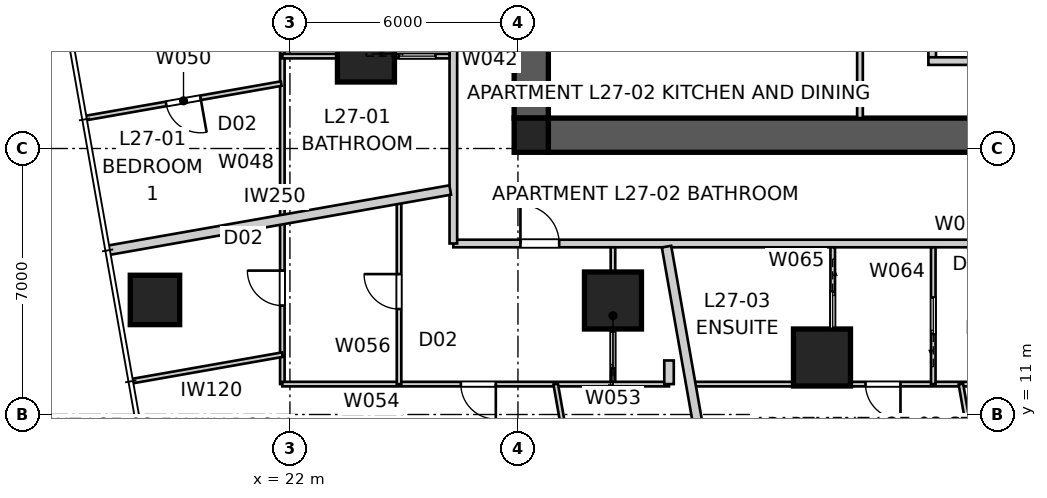
"""IFC4 building model, lengths in metres.
Left out: names, types, materials, properties, quantities, classifications, styles, units other than length and angle.
Written with IfcOpenShell. Run it as: python <this file> out.ifc"""

import sys

from ifc_helpers import new_model, si_unit, direction, frame, frame_2d, origin, origin_2d, place, context, subcontext, project, spatial, polyline, rectangle, outline, extrude, element, fill, save


model = new_model("IFC4")
c1 = context("Model", 3, precision=1e-05, world=origin(), true_north=direction((0.0, 1.0)))
c2 = subcontext(c1, "Body", "Model", "MODEL_VIEW")
j1 = project(units=[si_unit("LENGTHUNIT", "METRE"), si_unit("PLANEANGLEUNIT", "RADIAN")], contexts=[c1])
p1 = place(None, origin())
s1 = spatial("IfcSite", under=j1, at=p1, CompositionType="ELEMENT")
p2 = place(p1, origin())
s2 = spatial("IfcBuilding", under=s1, at=p2, CompositionType="ELEMENT")
p3 = place(p2, frame((0.0, 0.0, 99.8)))
s3 = spatial("IfcBuildingStorey", under=s2, at=p3, CompositionType="ELEMENT", Elevation=99.8)
p4 = place(p3, frame((51.2, 18.35, 0.0), z_axis=(0.0, 0.0, 1.0), x_axis=(-1.0, 0.0, 0.0)))
e1 = element("IfcWall", 1, at=p4, inside=s3, PredefinedType="SHEAR", context=c2, shape_type="SweptSolid", body=[
    extrude(outline(polyline([(0.0, -0.45), (22.4, -0.45), (22.4, -0.025), (22.85, -0.025), (22.85, 0.025), (22.4, 0.025), (22.4, 0.45), (0.0, 0.45), (0.0, 0.025), (-0.45, 0.025), (-0.45, -0.025), (0.0, -0.025), (0.0, -0.45)])), origin(), (0.0, 0.0, 1.0), 3.4),
])
p5 = place(p3, frame((28.35, 41.2, 0.0), z_axis=(0.0, 0.0, 1.0), x_axis=(0.0, -1.0, 0.0)))
e2 = element("IfcWall", 2, at=p5, inside=s3, PredefinedType="SHEAR", context=c2, shape_type="SweptSolid", body=[
    extrude(outline(polyline([(0.0, -0.45), (22.4, -0.45), (22.4, -0.025), (22.85, -0.025), (22.85, 0.025), (22.4, 0.025), (22.4, 0.45), (0.0, 0.45), (0.0, 0.025), (-0.45, 0.025), (-0.45, -0.025), (0.0, -0.025), (0.0, -0.45)])), origin(), (0.0, 0.0, 1.0), 3.4),
])
p6 = place(p5, frame((11.14, 0.0, 0.0)))
e3 = element("IfcOpeningElement", 3, at=p6, cuts=e2, PredefinedType="OPENING", context=c2, shape_type="SweptSolid", body=[
    extrude(rectangle(XDim=1.02, YDim=2.4, at=frame_2d((0.51, 1.2))), frame((0.0, 0.46, 0.0), z_axis=(0.0, -1.0, 0.0), x_axis=(1.0, 0.0, 0.0)), (0.0, 0.0, 1.0), 0.92),
])
p7 = place(p3, frame((38.9, 22.4, 0.0), z_axis=(0.0, 0.0, 1.0), x_axis=(0.0, -1.0, 0.0)))
e4 = element("IfcWall", 4, at=p7, inside=s3, PredefinedType="SOLIDWALL", context=c2, shape_type="SweptSolid", body=[
    extrude(rectangle(XDim=2.0, YDim=0.2, at=frame_2d((1.0, 0.0))), origin(), (0.0, 0.0, 1.0), 3.4),
])
p8 = place(p3, frame((38.8, 20.3, 0.0), z_axis=(0.0, 0.0, 1.0), x_axis=(1.0, 0.0, 0.0)))
e5 = element("IfcWall", 5, at=p8, inside=s3, PredefinedType="SOLIDWALL", context=c2, shape_type="SweptSolid", body=[
    extrude(rectangle(XDim=2.4, YDim=0.2, at=frame_2d((1.2, 0.0))), origin(), (0.0, 0.0, 1.0), 3.4),
])
p9 = place(p3, frame((28.35, 18.35, 0.0), z_axis=(0.0, 0.0, 1.0), x_axis=(1.0, 0.0, 0.0)))
e6 = element("IfcColumn", 6, at=p9, inside=s3, PredefinedType="COLUMN", context=c2, shape_type="SweptSolid", body=[
    extrude(rectangle(XDim=0.9, YDim=0.9, at=origin_2d()), origin(), (0.0, 0.0, 1.0), 3.4),
])
p10 = place(p3, frame((18.448, 14.015, 0.0), z_axis=(0.0, 0.0, 1.0), x_axis=(1.0, 0.0, 0.0)))
e7 = element("IfcColumn", 7, at=p10, inside=s3, PredefinedType="COLUMN", context=c2, shape_type="SweptSolid", body=[
    extrude(rectangle(XDim=1.3, YDim=1.3, at=origin_2d()), origin(), (0.0, 0.0, 1.0), 3.4),
])
for number, where, z_axis, x_axis in (
    (8, (24.0, 20.5, 0.0), (0.0, 0.0, 1.0), (1.0, 0.0, 0.0)),
    (9, (30.5, 14.0, 0.0), (0.0, 0.0, 1.0), (1.0, 0.0, 0.0)),
    (10, (36.0, 12.5, 0.0), (0.0, 0.0, 1.0), (1.0, 0.0, 0.0)),
):
    element("IfcColumn", number, at=place(p3, frame(where, z_axis=z_axis, x_axis=x_axis)), inside=s3, PredefinedType="COLUMN", context=c2, shape_type="SweptSolid", body=[
        extrude(rectangle(XDim=1.5, YDim=1.5, at=origin_2d()), origin(), (0.0, 0.0, 1.0), 3.4),
    ])
p11 = place(p3, frame((26.3, 15.5, 0.0), z_axis=(0.0, 0.0, 1.0), x_axis=(1.0, 0.0, 0.0)))
e11 = element("IfcWall", 11, at=p11, inside=s3, PredefinedType="PARTITIONING", context=c2, shape_type="SweptSolid", body=[
    extrude(rectangle(XDim=27.4, YDim=0.2, at=frame_2d((13.7, 0.0))), origin(), (0.0, 0.0, 1.0), 3.25),
])
p12 = place(p11, frame((24.005, 0.0, 0.0)))
e12 = element("IfcOpeningElement", 12, at=p12, cuts=e11, PredefinedType="OPENING", context=c2, shape_type="SweptSolid", body=[
    extrude(rectangle(XDim=1.02, YDim=2.1, at=frame_2d((0.51, 1.05))), frame((0.0, 0.11, 0.0), z_axis=(0.0, -1.0, 0.0), x_axis=(1.0, 0.0, 0.0)), (0.0, 0.0, 1.0), 0.22),
])
p13 = place(p11, frame((1.765, 0.0, 0.0)))
e13 = element("IfcOpeningElement", 13, at=p13, cuts=e11, PredefinedType="OPENING", context=c2, shape_type="SweptSolid", body=[
    extrude(rectangle(XDim=1.02, YDim=2.1, at=frame_2d((0.51, 1.05))), frame((0.0, 0.11, 0.0), z_axis=(0.0, -1.0, 0.0), x_axis=(1.0, 0.0, 0.0)), (0.0, 0.0, 1.0), 0.22),
])
p14 = place(p3, frame((26.3, 44.5, 0.0), z_axis=(0.0, 0.0, 1.0), x_axis=(0.0, -1.0, 0.0)))
e14 = element("IfcWall", 14, at=p14, inside=s3, PredefinedType="PARTITIONING", context=c2, shape_type="SweptSolid", body=[
    extrude(rectangle(XDim=29.0, YDim=0.2, at=frame_2d((14.5, 0.0))), origin(), (0.0, 0.0, 1.0), 3.25),
])
p15 = place(p14, frame((14.257, 0.0, 0.0)))
e15 = element("IfcOpeningElement", 15, at=p15, cuts=e14, PredefinedType="OPENING", context=c2, shape_type="SweptSolid", body=[
    extrude(rectangle(XDim=1.02, YDim=2.34, at=frame_2d((0.51, 1.17))), frame((0.0, 0.11, 0.0), z_axis=(0.0, -1.0, 0.0), x_axis=(1.0, 0.0, 0.0)), (0.0, 0.0, 1.0), 0.22),
])
p16 = place(p14, frame((18.322, 0.0, 0.0)))
e16 = element("IfcOpeningElement", 16, at=p16, cuts=e14, PredefinedType="OPENING", context=c2, shape_type="SweptSolid", body=[
    extrude(rectangle(XDim=1.02, YDim=2.34, at=frame_2d((0.51, 1.17))), frame((0.0, 0.11, 0.0), z_axis=(0.0, -1.0, 0.0), x_axis=(1.0, 0.0, 0.0)), (0.0, 0.0, 1.0), 0.22),
])
p17 = place(p14, frame((3.963, 0.0, 0.0)))
e17 = element("IfcOpeningElement", 17, at=p17, cuts=e14, PredefinedType="OPENING", context=c2, shape_type="SweptSolid", body=[
    extrude(rectangle(XDim=1.02, YDim=2.34, at=frame_2d((0.51, 1.17))), frame((0.0, 0.11, 0.0), z_axis=(0.0, -1.0, 0.0), x_axis=(1.0, 0.0, 0.0)), (0.0, 0.0, 1.0), 0.22),
])
p18 = place(p3, frame((34.001, 3.556, 0.0), z_axis=(0.0, 0.0, 1.0), x_axis=(-0.173654664517, 0.984806609184, 0.0)))
e18 = element("IfcWall", 18, at=p18, inside=s3, PredefinedType="PARTITIONING", context=c2, shape_type="SweptSolid", body=[
    extrude(rectangle(XDim=12.044, YDim=0.25, at=frame_2d((6.022, 0.0))), origin(), (0.0, 0.0, 1.0), 3.25),
])
p19 = place(p3, frame((17.203, 15.318, 0.0), z_axis=(0.0, 0.0, 1.0), x_axis=(0.984810933893, 0.173630137029, 0.0)))
e19 = element("IfcWall", 19, at=p19, inside=s3, PredefinedType="PARTITIONING", context=c2, shape_type="SweptSolid", body=[
    extrude(rectangle(XDim=9.154, YDim=0.25, at=frame_2d((4.577, 0.0))), origin(), (0.0, 0.0, 1.0), 3.25),
])
p20 = place(p3, frame((37.0, 18.8, 0.0), z_axis=(0.0, 0.0, 1.0), x_axis=(0.0, 1.0, 0.0)))
e20 = element("IfcWall", 20, at=p20, inside=s3, PredefinedType="SOLIDWALL", context=c2, shape_type="SweptSolid", body=[
    extrude(rectangle(XDim=5.9, YDim=0.15, at=frame_2d((2.95, 0.0))), origin(), (0.0, 0.0, 1.0), 3.25),
])
p21 = place(p3, frame((21.8, 11.8, 0.0), z_axis=(0.0, 0.0, 1.0), x_axis=(0.0, 1.0, 0.0)))
e21 = element("IfcWall", 21, at=p21, inside=s3, PredefinedType="PARTITIONING", context=c2, shape_type="SweptSolid", body=[
    extrude(rectangle(XDim=25.653, YDim=0.12, at=frame_2d((12.826, 0.0))), origin(), (0.0, 0.0, 1.0), 3.25),
])
p22 = place(p21, frame((16.333, 0.0, 0.0)))
e22 = element("IfcOpeningElement", 22, at=p22, cuts=e21, PredefinedType="OPENING", context=c2, shape_type="SweptSolid", body=[
    extrude(rectangle(XDim=0.92, YDim=2.34, at=frame_2d((0.46, 1.17))), frame((0.0, 0.07, 0.0), z_axis=(0.0, -1.0, 0.0), x_axis=(1.0, 0.0, 0.0)), (0.0, 0.0, 1.0), 0.14),
])
p23 = place(p21, frame((18.821, 0.0, 0.0)))
e23 = element("IfcOpeningElement", 23, at=p23, cuts=e21, PredefinedType="OPENING", context=c2, shape_type="SweptSolid", body=[
    extrude(rectangle(XDim=0.92, YDim=2.34, at=frame_2d((0.46, 1.17))), frame((0.0, 0.07, 0.0), z_axis=(0.0, -1.0, 0.0), x_axis=(1.0, 0.0, 0.0)), (0.0, 0.0, 1.0), 0.14),
])
p24 = place(p21, frame((12.401, 0.0, 0.0)))
e24 = element("IfcOpeningElement", 24, at=p24, cuts=e21, PredefinedType="OPENING", context=c2, shape_type="SweptSolid", body=[
    extrude(rectangle(XDim=0.92, YDim=2.34, at=frame_2d((0.46, 1.17))), frame((0.0, 0.07, 0.0), z_axis=(0.0, -1.0, 0.0), x_axis=(1.0, 0.0, 0.0)), (0.0, 0.0, 1.0), 0.14),
])
p25 = place(p21, frame((2.066, 0.0, 0.0)))
e25 = element("IfcOpeningElement", 25, at=p25, cuts=e21, PredefinedType="OPENING", context=c2, shape_type="SweptSolid", body=[
    extrude(rectangle(XDim=0.92, YDim=2.34, at=frame_2d((0.46, 1.17))), frame((0.0, 0.07, 0.0), z_axis=(0.0, -1.0, 0.0), x_axis=(1.0, 0.0, 0.0)), (0.0, 0.0, 1.0), 0.14),
])
p26 = place(p21, frame((23.651, 0.0, 0.0)))
e26 = element("IfcOpeningElement", 26, at=p26, cuts=e21, PredefinedType="OPENING", context=c2, shape_type="SweptSolid", body=[
    extrude(rectangle(XDim=0.96, YDim=2.1, at=frame_2d((0.48, 1.05))), frame((0.0, 0.07, 0.0), z_axis=(0.0, -1.0, 0.0), x_axis=(1.0, 0.0, 0.0)), (0.0, 0.0, 1.0), 0.14),
])
p27 = place(p3, frame((21.8, 20.431, 0.0), z_axis=(0.0, 0.0, 1.0), x_axis=(1.0, 0.0, 0.0)))
e27 = element("IfcWall", 27, at=p27, inside=s3, PredefinedType="PARTITIONING", context=c2, shape_type="SweptSolid", body=[
    extrude(rectangle(XDim=4.4, YDim=0.12, at=frame_2d((2.2, 0.0))), origin(), (0.0, 0.0, 1.0), 3.25),
])
p28 = place(p27, frame((3.07, 0.0, 0.0)))
e28 = element("IfcOpeningElement", 28, at=p28, cuts=e27, PredefinedType="OPENING", context=c2, shape_type="SweptSolid", body=[
    extrude(rectangle(XDim=0.96, YDim=2.1, at=frame_2d((0.48, 1.05))), frame((0.0, 0.07, 0.0), z_axis=(0.0, -1.0, 0.0), x_axis=(1.0, 0.0, 0.0)), (0.0, 0.0, 1.0), 0.14),
])
p29 = place(p3, frame((21.77, 19.708, 0.0), z_axis=(0.0, 0.0, 1.0), x_axis=(-0.984812268581, -0.173622566657, 0.0)))
e29 = element("IfcWall", 29, at=p29, inside=s3, PredefinedType="PARTITIONING", context=c2, shape_type="SweptSolid", body=[
    extrude(rectangle(XDim=5.22, YDim=0.12, at=frame_2d((2.61, 0.0))), origin(), (0.0, 0.0, 1.0), 3.25),
])
p30 = place(p29, frame((2.155, 0.0, 0.0)))
e30 = element("IfcOpeningElement", 30, at=p30, cuts=e29, PredefinedType="OPENING", context=c2, shape_type="SweptSolid", body=[
    extrude(rectangle(XDim=0.92, YDim=2.34, at=frame_2d((0.46, 1.17))), frame((0.0, 0.07, 0.0), z_axis=(0.0, -1.0, 0.0), x_axis=(1.0, 0.0, 0.0)), (0.0, 0.0, 1.0), 0.14),
])
p31 = place(p3, frame((30.5, 11.8, 0.0), z_axis=(0.0, 0.0, 1.0), x_axis=(0.0, 1.0, 0.0)))
e31 = element("IfcWall", 31, at=p31, inside=s3, PredefinedType="PARTITIONING", context=c2, shape_type="SweptSolid", body=[
    extrude(rectangle(XDim=3.6, YDim=0.12, at=frame_2d((1.8, 0.0))), origin(), (0.0, 0.0, 1.0), 3.25),
])
p32 = place(p31, frame((0.42, 0.0, 0.0)))
e32 = element("IfcOpeningElement", 32, at=p32, cuts=e31, PredefinedType="OPENING", context=c2, shape_type="SweptSolid", body=[
    extrude(rectangle(XDim=0.96, YDim=2.1, at=frame_2d((0.48, 1.05))), frame((0.0, 0.07, 0.0), z_axis=(0.0, -1.0, 0.0), x_axis=(1.0, 0.0, 0.0)), (0.0, 0.0, 1.0), 0.14),
])
p33 = place(p3, frame((31.975, 11.8, 0.0), z_axis=(0.0, 0.0, 1.0), x_axis=(-1.0, 0.0, 0.0)))
e33 = element("IfcWall", 33, at=p33, inside=s3, PredefinedType="PARTITIONING", context=c2, shape_type="SweptSolid", body=[
    extrude(rectangle(XDim=10.175, YDim=0.12, at=frame_2d((5.088, 0.0))), origin(), (0.0, 0.0, 1.0), 3.25),
])
p34 = place(p33, frame((4.558, 0.0, 0.0)))
e34 = element("IfcOpeningElement", 34, at=p34, cuts=e33, PredefinedType="OPENING", context=c2, shape_type="SweptSolid", body=[
    extrude(rectangle(XDim=0.92, YDim=2.34, at=frame_2d((0.46, 1.17))), frame((0.0, 0.07, 0.0), z_axis=(0.0, -1.0, 0.0), x_axis=(1.0, 0.0, 0.0)), (0.0, 0.0, 1.0), 0.14),
])
p35 = place(p3, frame((31.975, 12.422, 0.0), z_axis=(0.0, 0.0, 1.0), x_axis=(0.0, -1.0, 0.0)))
e35 = element("IfcWall", 35, at=p35, inside=s3, PredefinedType="PARTITIONING", context=c2, shape_type="SweptSolid", body=[
    extrude(rectangle(XDim=0.622, YDim=0.25, at=frame_2d((0.311, 0.0))), origin(), (0.0, 0.0, 1.0), 3.25),
])
p36 = place(p3, frame((24.871, 11.8, 0.0), z_axis=(0.0, 0.0, 1.0), x_axis=(0.0, 1.0, 0.0)))
e36 = element("IfcWall", 36, at=p36, inside=s3, PredefinedType="PARTITIONING", context=c2, shape_type="SweptSolid", body=[
    extrude(rectangle(XDim=4.87, YDim=0.12, at=frame_2d((2.435, 0.0))), origin(), (0.0, 0.0, 1.0), 3.25),
])
p37 = place(p36, frame((1.975, 0.0, 0.0)))
e37 = element("IfcOpeningElement", 37, at=p37, cuts=e36, PredefinedType="OPENING", context=c2, shape_type="SweptSolid", body=[
    extrude(rectangle(XDim=0.92, YDim=2.34, at=frame_2d((0.46, 1.17))), frame((0.0, 0.07, 0.0), z_axis=(0.0, -1.0, 0.0), x_axis=(1.0, 0.0, 0.0)), (0.0, 0.0, 1.0), 0.14),
])
p38 = place(p3, frame((28.993, 11.8, 0.0), z_axis=(0.0, 0.0, 1.0), x_axis=(0.173639020759, -0.984809367578, 0.0)))
e38 = element("IfcWall", 38, at=p38, inside=s3, PredefinedType="PARTITIONING", context=c2, shape_type="SweptSolid", body=[
    extrude(rectangle(XDim=8.948, YDim=0.12, at=frame_2d((4.474, 0.0))), origin(), (0.0, 0.0, 1.0), 2.638),
])
p39 = place(p38, frame((1.234, 0.0, 0.0)))
e39 = element("IfcOpeningElement", 39, at=p39, cuts=e38, PredefinedType="OPENING", context=c2, shape_type="SweptSolid", body=[
    extrude(rectangle(XDim=0.92, YDim=2.34, at=frame_2d((0.46, 1.17))), frame((0.0, 0.07, 0.0), z_axis=(0.0, -1.0, 0.0), x_axis=(1.0, 0.0, 0.0)), (0.0, 0.0, 1.0), 0.14),
])
p40 = place(p3, frame((17.85, 11.878, 0.0), z_axis=(0.0, 0.0, 1.0), x_axis=(0.984803775068, 0.173670736201, 0.0)))
e40 = element("IfcWall", 40, at=p40, inside=s3, PredefinedType="PARTITIONING", context=c2, shape_type="SweptSolid", body=[
    extrude(rectangle(XDim=4.011, YDim=0.12, at=frame_2d((2.005, 0.0))), origin(), (0.0, 0.0, 1.0), 2.638),
])
p41 = place(p3, frame((58.2, 11.8, 0.0), z_axis=(0.0, 0.0, 1.0), x_axis=(-1.0, 0.0, 0.0)))
e41 = element("IfcWall", 41, at=p41, inside=s3, PredefinedType="PARTITIONING", context=c2, shape_type="SweptSolid", body=[
    extrude(rectangle(XDim=25.653, YDim=0.12, at=frame_2d((12.826, 0.0))), origin(), (0.0, 0.0, 1.0), 3.25),
])
p42 = place(p41, frame((7.342, 0.0, 0.0)))
e42 = element("IfcOpeningElement", 42, at=p42, cuts=e41, PredefinedType="OPENING", context=c2, shape_type="SweptSolid", body=[
    extrude(rectangle(XDim=0.92, YDim=2.34, at=frame_2d((0.46, 1.17))), frame((0.0, 0.07, 0.0), z_axis=(0.0, -1.0, 0.0), x_axis=(1.0, 0.0, 0.0)), (0.0, 0.0, 1.0), 0.14),
])
p43 = place(p41, frame((12.394, 0.0, 0.0)))
e43 = element("IfcOpeningElement", 43, at=p43, cuts=e41, PredefinedType="OPENING", context=c2, shape_type="SweptSolid", body=[
    extrude(rectangle(XDim=0.96, YDim=2.1, at=frame_2d((0.48, 1.05))), frame((0.0, 0.07, 0.0), z_axis=(0.0, -1.0, 0.0), x_axis=(1.0, 0.0, 0.0)), (0.0, 0.0, 1.0), 0.14),
])
p44 = place(p41, frame((16.288, 0.0, 0.0)))
e44 = element("IfcOpeningElement", 44, at=p44, cuts=e41, PredefinedType="OPENING", context=c2, shape_type="SweptSolid", body=[
    extrude(rectangle(XDim=0.96, YDim=2.1, at=frame_2d((0.48, 1.05))), frame((0.0, 0.07, 0.0), z_axis=(0.0, -1.0, 0.0), x_axis=(1.0, 0.0, 0.0)), (0.0, 0.0, 1.0), 0.14),
])
p45 = place(p41, frame((20.134, 0.0, 0.0)))
e45 = element("IfcOpeningElement", 45, at=p45, cuts=e41, PredefinedType="OPENING", context=c2, shape_type="SweptSolid", body=[
    extrude(rectangle(XDim=0.92, YDim=2.34, at=frame_2d((0.46, 1.17))), frame((0.0, 0.07, 0.0), z_axis=(0.0, -1.0, 0.0), x_axis=(1.0, 0.0, 0.0)), (0.0, 0.0, 1.0), 0.14),
])
p46 = place(p3, frame((38.929, 11.8, 0.0), z_axis=(0.0, 0.0, 1.0), x_axis=(0.0, 1.0, 0.0)))
e46 = element("IfcWall", 46, at=p46, inside=s3, PredefinedType="PARTITIONING", context=c2, shape_type="SweptSolid", body=[
    extrude(rectangle(XDim=3.6, YDim=0.12, at=frame_2d((1.8, 0.0))), origin(), (0.0, 0.0, 1.0), 3.25),
])
p47 = place(p46, frame((1.32, 0.0, 0.0)))
e47 = element("IfcOpeningElement", 47, at=p47, cuts=e46, PredefinedType="OPENING", context=c2, shape_type="SweptSolid", body=[
    extrude(rectangle(XDim=0.96, YDim=2.1, at=frame_2d((0.48, 1.05))), frame((0.0, 0.07, 0.0), z_axis=(0.0, -1.0, 0.0), x_axis=(1.0, 0.0, 0.0)), (0.0, 0.0, 1.0), 0.14),
])
p48 = place(p3, frame((36.283, 15.4, 0.0), z_axis=(0.0, 0.0, 1.0), x_axis=(0.0, -1.0, 0.0)))
e48 = element("IfcWall", 48, at=p48, inside=s3, PredefinedType="PARTITIONING", context=c2, shape_type="SweptSolid", body=[
    extrude(rectangle(XDim=3.6, YDim=0.12, at=frame_2d((1.8, 0.0))), origin(), (0.0, 0.0, 1.0), 3.25),
])
p49 = place(p48, frame((1.17, 0.0, 0.0)))
e49 = element("IfcOpeningElement", 49, at=p49, cuts=e48, PredefinedType="OPENING", context=c2, shape_type="SweptSolid", body=[
    extrude(rectangle(XDim=0.96, YDim=2.1, at=frame_2d((0.48, 1.05))), frame((0.0, 0.07, 0.0), z_axis=(0.0, -1.0, 0.0), x_axis=(1.0, 0.0, 0.0)), (0.0, 0.0, 1.0), 0.14),
])
p50 = place(p3, frame((39.655, 11.8, 0.0), z_axis=(0.0, 0.0, 1.0), x_axis=(0.17363617165, -0.984809869921, 0.0)))
e50 = element("IfcWall", 50, at=p50, inside=s3, PredefinedType="PARTITIONING", context=c2, shape_type="SweptSolid", body=[
    extrude(rectangle(XDim=7.096, YDim=0.12, at=frame_2d((3.548, 0.0))), origin(), (0.0, 0.0, 1.0), 3.25),
])
p51 = place(p13, origin())
e51 = element("IfcDoor", 51, at=p51, inside=s3, OperationType="SINGLE_SWING_LEFT", PredefinedType="DOOR", context=c2, shape_type="SweptSolid", body=[
    extrude(rectangle(XDim=1.02, YDim=2.1, at=frame_2d((0.51, 1.05))), frame((0.0, 0.025, 0.0), z_axis=(0.0, -1.0, 0.0), x_axis=(1.0, 0.0, 0.0)), (0.0, 0.0, 1.0), 0.05),
])
fill(e13, e51)
p52 = place(p37, origin())
e52 = element("IfcDoor", 52, at=p52, inside=s3, OperationType="SINGLE_SWING_RIGHT", PredefinedType="DOOR", context=c2, shape_type="SweptSolid", body=[
    extrude(rectangle(XDim=0.92, YDim=2.34, at=frame_2d((0.46, 1.17))), frame((0.0, 0.025, 0.0), z_axis=(0.0, -1.0, 0.0), x_axis=(1.0, 0.0, 0.0)), (0.0, 0.0, 1.0), 0.05),
])
fill(e37, e52)
p53 = place(p34, origin())
e53 = element("IfcDoor", 53, at=p53, inside=s3, OperationType="SINGLE_SWING_LEFT", PredefinedType="DOOR", context=c2, shape_type="SweptSolid", body=[
    extrude(rectangle(XDim=0.92, YDim=2.34, at=frame_2d((0.46, 1.17))), frame((0.0, 0.025, 0.0), z_axis=(0.0, -1.0, 0.0), x_axis=(1.0, 0.0, 0.0)), (0.0, 0.0, 1.0), 0.05),
])
fill(e34, e53)
p54 = place(p32, origin())
e54 = element("IfcDoor", 54, at=p54, inside=s3, OperationType="SLIDING_TO_LEFT", PredefinedType="DOOR", context=c2, shape_type="SweptSolid", body=[
    extrude(rectangle(XDim=0.96, YDim=2.1, at=frame_2d((0.48, 1.05))), frame((0.0, 0.025, 0.0), z_axis=(0.0, -1.0, 0.0), x_axis=(1.0, 0.0, 0.0)), (0.0, 0.0, 1.0), 0.05),
])
fill(e32, e54)
p55 = place(p28, origin())
e55 = element("IfcDoor", 55, at=p55, inside=s3, OperationType="SLIDING_TO_LEFT", PredefinedType="DOOR", context=c2, shape_type="SweptSolid", body=[
    extrude(rectangle(XDim=0.96, YDim=2.1, at=frame_2d((0.48, 1.05))), frame((0.0, 0.025, 0.0), z_axis=(0.0, -1.0, 0.0), x_axis=(1.0, 0.0, 0.0)), (0.0, 0.0, 1.0), 0.05),
])
fill(e28, e55)
p56 = place(p30, origin())
e56 = element("IfcDoor", 56, at=p56, inside=s3, OperationType="SINGLE_SWING_LEFT", PredefinedType="DOOR", context=c2, shape_type="SweptSolid", body=[
    extrude(rectangle(XDim=0.92, YDim=2.34, at=frame_2d((0.46, 1.17))), frame((0.0, 0.025, 0.0), z_axis=(0.0, -1.0, 0.0), x_axis=(1.0, 0.0, 0.0)), (0.0, 0.0, 1.0), 0.05),
])
fill(e30, e56)
p57 = place(p25, origin())
e57 = element("IfcDoor", 57, at=p57, inside=s3, OperationType="SINGLE_SWING_RIGHT", PredefinedType="DOOR", context=c2, shape_type="SweptSolid", body=[
    extrude(rectangle(XDim=0.92, YDim=2.34, at=frame_2d((0.46, 1.17))), frame((0.0, 0.025, 0.0), z_axis=(0.0, -1.0, 0.0), x_axis=(1.0, 0.0, 0.0)), (0.0, 0.0, 1.0), 0.05),
])
fill(e25, e57)
p58 = place(p47, origin())
e58 = element("IfcDoor", 58, at=p58, inside=s3, OperationType="SLIDING_TO_LEFT", PredefinedType="DOOR", context=c2, shape_type="SweptSolid", body=[
    extrude(rectangle(XDim=0.96, YDim=2.1, at=frame_2d((0.48, 1.05))), frame((0.0, 0.025, 0.0), z_axis=(0.0, -1.0, 0.0), x_axis=(1.0, 0.0, 0.0)), (0.0, 0.0, 1.0), 0.05),
])
fill(e47, e58)
p59 = place(p49, origin())
e59 = element("IfcDoor", 59, at=p59, inside=s3, OperationType="SLIDING_TO_LEFT", PredefinedType="DOOR", context=c2, shape_type="SweptSolid", body=[
    extrude(rectangle(XDim=0.96, YDim=2.1, at=frame_2d((0.48, 1.05))), frame((0.0, 0.025, 0.0), z_axis=(0.0, -1.0, 0.0), x_axis=(1.0, 0.0, 0.0)), (0.0, 0.0, 1.0), 0.05),
])
fill(e49, e59)
p60 = place(p45, origin())
e60 = element("IfcDoor", 60, at=p60, inside=s3, OperationType="SINGLE_SWING_LEFT", PredefinedType="DOOR", context=c2, shape_type="SweptSolid", body=[
    extrude(rectangle(XDim=0.92, YDim=2.34, at=frame_2d((0.46, 1.17))), frame((0.0, 0.025, 0.0), z_axis=(0.0, -1.0, 0.0), x_axis=(1.0, 0.0, 0.0)), (0.0, 0.0, 1.0), 0.05),
])
fill(e45, e60)
save(model, sys.argv[1])
